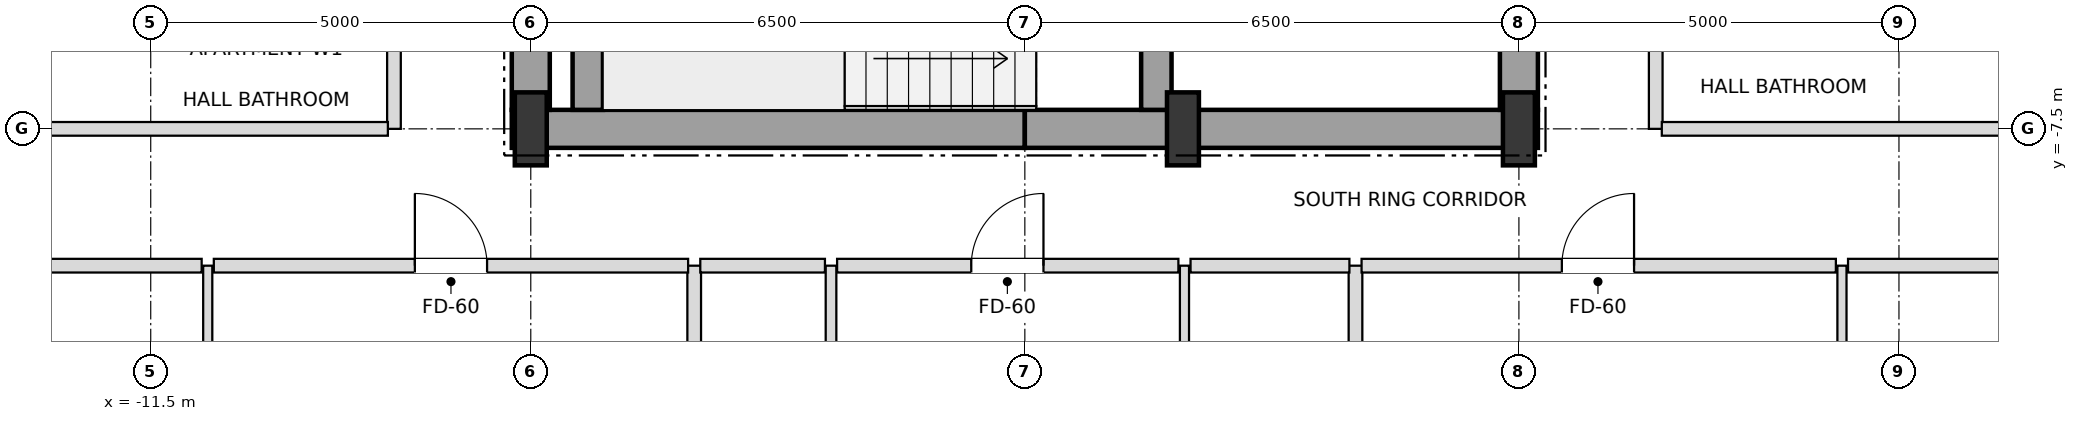
"""IFC4 building model, lengths in metres.
Left out: names, types, materials, properties, quantities, classifications, styles, units other than length and angle.
Written with IfcOpenShell. Run it as: python <this file> out.ifc"""

import sys

from ifc_helpers import new_model, si_unit, direction, frame, frame_2d, origin, origin_2d, place, context, subcontext, project, spatial, rectangle, i_section, extrude, element, fill, save


model = new_model("IFC4")
c1 = context("Model", 3, precision=1e-05, world=origin(), true_north=direction((0.0, 1.0)))
c2 = subcontext(c1, "Body", "Model", "MODEL_VIEW")
j1 = project(units=[si_unit("LENGTHUNIT", "METRE"), si_unit("PLANEANGLEUNIT", "RADIAN")], contexts=[c1])
p1 = place(None, origin())
s1 = spatial("IfcSite", under=j1, at=p1, CompositionType="ELEMENT")
p2 = place(p1, origin())
s2 = spatial("IfcBuilding", under=s1, at=p2, CompositionType="ELEMENT")
p3 = place(p2, frame((0.0, 0.0, 117.0)))
s3 = spatial("IfcBuildingStorey", under=s2, at=p3, CompositionType="ELEMENT", Elevation=117.0)
for number, where, z_axis, x_axis in (
    (1, (-6.5, -7.5, 0.0), (0.0, 0.0, 1.0), (1.0, 0.0, 0.0)),
    (2, (2.08, -7.5, 0.0), (0.0, 0.0, 1.0), (1.0, 0.0, 0.0)),
    (3, (6.5, -7.5, 0.0), (0.0, 0.0, 1.0), (1.0, 0.0, 0.0)),
):
    element("IfcColumn", number, at=place(p3, frame(where, z_axis=z_axis, x_axis=x_axis)), inside=s3, PredefinedType="COLUMN", context=c2, shape_type="SweptSolid", body=[
        extrude(i_section(OverallWidth=0.42, OverallDepth=0.96, WebThickness=0.022, FlangeThickness=0.034, at=origin_2d()), origin(), (0.0, 0.0, 1.0), 3.6),
    ])
for number, where, z_axis, x_axis in (
    (4, (-6.75, -7.5, 0.0), (0.0, 0.0, 1.0), (1.0, 0.0, 0.0)),
    (5, (0.0, -7.5, 0.0), (0.0, 0.0, 1.0), (1.0, 0.0, 0.0)),
):
    element("IfcWall", number, at=place(p3, frame(where, z_axis=z_axis, x_axis=x_axis)), inside=s3, PredefinedType="SHEAR", context=c2, shape_type="SweptSolid", body=[
        extrude(rectangle(XDim=6.75, YDim=0.5, at=frame_2d((3.375, 0.0))), origin(), (0.0, 0.0, 1.0), 3.3),
    ])
p4 = place(p3, frame((-6.5, -7.25, 0.0), z_axis=(0.0, 0.0, 1.0), x_axis=(0.0, 1.0, 0.0)))
e6 = element("IfcWall", 6, at=p4, inside=s3, PredefinedType="SHEAR", context=c2, shape_type="SweptSolid", body=[
    extrude(rectangle(XDim=3.55, YDim=0.5, at=frame_2d((1.775, 0.0))), origin(), (0.0, 0.0, 1.0), 3.3),
])
p5 = place(p3, frame((6.5, -7.25, 0.0), z_axis=(0.0, 0.0, 1.0), x_axis=(0.0, 1.0, 0.0)))
e7 = element("IfcWall", 7, at=p5, inside=s3, PredefinedType="SHEAR", context=c2, shape_type="SweptSolid", body=[
    extrude(rectangle(XDim=5.75, YDim=0.5, at=frame_2d((2.875, 0.0))), origin(), (0.0, 0.0, 1.0), 3.3),
])
p6 = place(p5, frame((0.85, 0.0, 0.0)))
e8 = element("IfcOpeningElement", 8, at=p6, cuts=e7, PredefinedType="OPENING", context=c2, shape_type="SweptSolid", body=[
    extrude(rectangle(XDim=1.05, YDim=2.15, at=frame_2d((0.525, 1.075))), frame((0.0, 0.26, 0.0), z_axis=(0.0, -1.0, 0.0), x_axis=(1.0, 0.0, 0.0)), (0.0, 0.0, 1.0), 0.52),
])
p7 = place(p3, frame((-5.75, -7.25, 0.0), z_axis=(0.0, 0.0, 1.0), x_axis=(0.0, 1.0, 0.0)))
e9 = element("IfcWall", 9, at=p7, inside=s3, PredefinedType="SHEAR", context=c2, shape_type="SweptSolid", body=[
    extrude(rectangle(XDim=2.9, YDim=0.4, at=frame_2d((1.45, 0.0))), origin(), (0.0, 0.0, 1.0), 3.3),
])
p8 = place(p3, frame((1.73, -7.25, 0.0), z_axis=(0.0, 0.0, 1.0), x_axis=(0.0, 1.0, 0.0)))
e10 = element("IfcWall", 10, at=p8, inside=s3, PredefinedType="SHEAR", context=c2, shape_type="SweptSolid", body=[
    extrude(rectangle(XDim=3.3, YDim=0.4, at=frame_2d((1.65, 0.0))), origin(), (0.0, 0.0, 1.0), 3.3),
])
p9 = place(p8, frame((0.9, 0.0, 0.0)))
e11 = element("IfcOpeningElement", 11, at=p9, cuts=e10, PredefinedType="OPENING", context=c2, shape_type="SweptSolid", body=[
    extrude(rectangle(XDim=1.05, YDim=2.15, at=frame_2d((0.525, 1.075))), frame((0.0, 0.21, 0.0), z_axis=(0.0, -1.0, 0.0), x_axis=(1.0, 0.0, 0.0)), (0.0, 0.0, 1.0), 0.42),
])
p10 = place(p3, frame((-10.75, -17.15, 0.0), z_axis=(0.0, 0.0, 1.0), x_axis=(0.0, 1.0, 0.0)))
e12 = element("IfcWall", 12, at=p10, inside=s3, PredefinedType="PARTITIONING", context=c2, shape_type="SweptSolid", body=[
    extrude(rectangle(XDim=7.85, YDim=0.12, at=frame_2d((3.925, 0.0))), origin(), (0.0, 0.0, 1.0), 2.736),
])
p11 = place(p10, frame((2.681, 0.0, 0.0)))
e13 = element("IfcOpeningElement", 13, at=p11, cuts=e12, PredefinedType="OPENING", context=c2, shape_type="SweptSolid", body=[
    extrude(rectangle(XDim=0.95, YDim=2.1, at=frame_2d((0.475, 1.05))), frame((0.0, 0.07, 0.0), z_axis=(0.0, -1.0, 0.0), x_axis=(1.0, 0.0, 0.0)), (0.0, 0.0, 1.0), 0.14),
])
p12 = place(p3, frame((-8.3, -7.5, 0.0), z_axis=(0.0, 0.0, 1.0), x_axis=(0.0, 1.0, 0.0)))
e14 = element("IfcWall", 14, at=p12, inside=s3, PredefinedType="PARTITIONING", context=c2, shape_type="SweptSolid", body=[
    extrude(rectangle(XDim=15.0, YDim=0.18, at=frame_2d((7.5, 0.0))), origin(), (0.0, 0.0, 1.0), 3.3),
])
p13 = place(p12, frame((3.145, 0.0, 0.0)))
e15 = element("IfcOpeningElement", 15, at=p13, cuts=e14, PredefinedType="OPENING", context=c2, shape_type="SweptSolid", body=[
    extrude(rectangle(XDim=0.95, YDim=2.15, at=frame_2d((0.475, 1.075))), frame((0.0, 0.1, 0.0), z_axis=(0.0, -1.0, 0.0), x_axis=(1.0, 0.0, 0.0)), (0.0, 0.0, 1.0), 0.2),
])
p14 = place(p12, frame((10.645, 0.0, 0.0)))
e16 = element("IfcOpeningElement", 16, at=p14, cuts=e14, PredefinedType="OPENING", context=c2, shape_type="SweptSolid", body=[
    extrude(rectangle(XDim=0.95, YDim=2.15, at=frame_2d((0.475, 1.075))), frame((0.0, 0.1, 0.0), z_axis=(0.0, -1.0, 0.0), x_axis=(1.0, 0.0, 0.0)), (0.0, 0.0, 1.0), 0.2),
])
p15 = place(p3, frame((-4.35, -23.15, 0.0), z_axis=(0.0, 0.0, 1.0), x_axis=(0.0, 1.0, 0.0)))
e17 = element("IfcWall", 17, at=p15, inside=s3, PredefinedType="PARTITIONING", context=c2, shape_type="SweptSolid", body=[
    extrude(rectangle(XDim=13.85, YDim=0.18, at=frame_2d((6.925, 0.0))), origin(), (0.0, 0.0, 1.0), 2.736),
])
p16 = place(p3, frame((-2.55, -17.15, 0.0), z_axis=(0.0, 0.0, 1.0), x_axis=(0.0, 1.0, 0.0)))
e18 = element("IfcWall", 18, at=p16, inside=s3, PredefinedType="PARTITIONING", context=c2, shape_type="SweptSolid", body=[
    extrude(rectangle(XDim=7.85, YDim=0.14, at=frame_2d((3.925, 0.0))), origin(), (0.0, 0.0, 1.0), 3.3),
])
p17 = place(p16, frame((3.48, 0.0, 0.0)))
e19 = element("IfcOpeningElement", 19, at=p17, cuts=e18, PredefinedType="OPENING", context=c2, shape_type="SweptSolid", body=[
    extrude(rectangle(XDim=0.9, YDim=2.1, at=frame_2d((0.45, 1.05))), frame((0.0, 0.08, 0.0), z_axis=(0.0, -1.0, 0.0), x_axis=(1.0, 0.0, 0.0)), (0.0, 0.0, 1.0), 0.16),
])
p18 = place(p3, frame((2.1, -17.15, 0.0), z_axis=(0.0, 0.0, 1.0), x_axis=(0.0, 1.0, 0.0)))
e20 = element("IfcWall", 20, at=p18, inside=s3, PredefinedType="PARTITIONING", context=c2, shape_type="SweptSolid", body=[
    extrude(rectangle(XDim=7.85, YDim=0.12, at=frame_2d((3.925, 0.0))), origin(), (0.0, 0.0, 1.0), 3.3),
])
p19 = place(p18, frame((3.455, 0.0, 0.0)))
e21 = element("IfcOpeningElement", 21, at=p19, cuts=e20, PredefinedType="OPENING", context=c2, shape_type="SweptSolid", body=[
    extrude(rectangle(XDim=0.95, YDim=2.1, at=frame_2d((0.475, 1.05))), frame((0.0, 0.07, 0.0), z_axis=(0.0, -1.0, 0.0), x_axis=(1.0, 0.0, 0.0)), (0.0, 0.0, 1.0), 0.14),
])
p20 = place(p3, frame((4.35, -23.15, 0.0), z_axis=(0.0, 0.0, 1.0), x_axis=(0.0, 1.0, 0.0)))
e22 = element("IfcWall", 22, at=p20, inside=s3, PredefinedType="PARTITIONING", context=c2, shape_type="SweptSolid", body=[
    extrude(rectangle(XDim=13.85, YDim=0.18, at=frame_2d((6.925, 0.0))), origin(), (0.0, 0.0, 1.0), 2.736),
])
p21 = place(p3, frame((8.3, -7.5, 0.0), z_axis=(0.0, 0.0, 1.0), x_axis=(0.0, 1.0, 0.0)))
e23 = element("IfcWall", 23, at=p21, inside=s3, PredefinedType="PARTITIONING", context=c2, shape_type="SweptSolid", body=[
    extrude(rectangle(XDim=15.0, YDim=0.18, at=frame_2d((7.5, 0.0))), origin(), (0.0, 0.0, 1.0), 3.3),
])
p22 = place(p21, frame((3.475, 0.0, 0.0)))
e24 = element("IfcOpeningElement", 24, at=p22, cuts=e23, PredefinedType="OPENING", context=c2, shape_type="SweptSolid", body=[
    extrude(rectangle(XDim=0.95, YDim=2.15, at=frame_2d((0.475, 1.075))), frame((0.0, 0.1, 0.0), z_axis=(0.0, -1.0, 0.0), x_axis=(1.0, 0.0, 0.0)), (0.0, 0.0, 1.0), 0.2),
])
p23 = place(p3, frame((10.75, -17.15, 0.0), z_axis=(0.0, 0.0, 1.0), x_axis=(0.0, 1.0, 0.0)))
e25 = element("IfcWall", 25, at=p23, inside=s3, PredefinedType="PARTITIONING", context=c2, shape_type="SweptSolid", body=[
    extrude(rectangle(XDim=7.85, YDim=0.12, at=frame_2d((3.925, 0.0))), origin(), (0.0, 0.0, 1.0), 2.736),
])
p24 = place(p23, frame((2.681, 0.0, 0.0)))
e26 = element("IfcOpeningElement", 26, at=p24, cuts=e25, PredefinedType="OPENING", context=c2, shape_type="SweptSolid", body=[
    extrude(rectangle(XDim=0.95, YDim=2.1, at=frame_2d((0.475, 1.05))), frame((0.0, 0.07, 0.0), z_axis=(0.0, -1.0, 0.0), x_axis=(1.0, 0.0, 0.0)), (0.0, 0.0, 1.0), 0.14),
])
p25 = place(p3, frame((-13.62, -9.3, 0.0), z_axis=(0.0, 0.0, 1.0), x_axis=(1.0, 0.0, 0.0)))
e27 = element("IfcWall", 27, at=p25, inside=s3, PredefinedType="PARTITIONING", context=c2, shape_type="SweptSolid", body=[
    extrude(rectangle(XDim=2.79, YDim=0.18, at=frame_2d((1.395, 0.0))), origin(), (0.0, 0.0, 1.0), 3.3),
])
p26 = place(p3, frame((-10.67, -9.3, 0.0), z_axis=(0.0, 0.0, 1.0), x_axis=(1.0, 0.0, 0.0)))
e28 = element("IfcWall", 28, at=p26, inside=s3, PredefinedType="PARTITIONING", context=c2, shape_type="SweptSolid", body=[
    extrude(rectangle(XDim=6.24, YDim=0.18, at=frame_2d((3.12, 0.0))), origin(), (0.0, 0.0, 1.0), 2.736),
])
p27 = place(p26, frame((2.645, 0.0, 0.0)))
e29 = element("IfcOpeningElement", 29, at=p27, cuts=e28, PredefinedType="OPENING", context=c2, shape_type="SweptSolid", body=[
    extrude(rectangle(XDim=0.95, YDim=2.15, at=frame_2d((0.475, 1.075))), frame((0.0, 0.1, 0.0), z_axis=(0.0, -1.0, 0.0), x_axis=(1.0, 0.0, 0.0)), (0.0, 0.0, 1.0), 0.2),
])
p28 = place(p3, frame((-4.27, -9.3, 0.0), z_axis=(0.0, 0.0, 1.0), x_axis=(1.0, 0.0, 0.0)))
e30 = element("IfcWall", 30, at=p28, inside=s3, PredefinedType="PARTITIONING", context=c2, shape_type="SweptSolid", body=[
    extrude(rectangle(XDim=1.64, YDim=0.18, at=frame_2d((0.82, 0.0))), origin(), (0.0, 0.0, 1.0), 3.3),
])
p29 = place(p3, frame((-2.47, -9.3, 0.0), z_axis=(0.0, 0.0, 1.0), x_axis=(1.0, 0.0, 0.0)))
e31 = element("IfcWall", 31, at=p29, inside=s3, PredefinedType="PARTITIONING", context=c2, shape_type="SweptSolid", body=[
    extrude(rectangle(XDim=4.49, YDim=0.18, at=frame_2d((2.245, 0.0))), origin(), (0.0, 0.0, 1.0), 3.3),
])
p30 = place(p29, frame((1.765, 0.0, 0.0)))
e32 = element("IfcOpeningElement", 32, at=p30, cuts=e31, PredefinedType="OPENING", context=c2, shape_type="SweptSolid", body=[
    extrude(rectangle(XDim=0.95, YDim=2.15, at=frame_2d((0.475, 1.075))), frame((0.0, 0.1, 0.0), z_axis=(0.0, -1.0, 0.0), x_axis=(1.0, 0.0, 0.0)), (0.0, 0.0, 1.0), 0.2),
])
p31 = place(p3, frame((2.18, -9.3, 0.0), z_axis=(0.0, 0.0, 1.0), x_axis=(1.0, 0.0, 0.0)))
e33 = element("IfcWall", 33, at=p31, inside=s3, PredefinedType="PARTITIONING", context=c2, shape_type="SweptSolid", body=[
    extrude(rectangle(XDim=2.09, YDim=0.18, at=frame_2d((1.045, 0.0))), origin(), (0.0, 0.0, 1.0), 3.3),
])
p32 = place(p3, frame((4.43, -9.3, 0.0), z_axis=(0.0, 0.0, 1.0), x_axis=(1.0, 0.0, 0.0)))
e34 = element("IfcWall", 34, at=p32, inside=s3, PredefinedType="PARTITIONING", context=c2, shape_type="SweptSolid", body=[
    extrude(rectangle(XDim=6.24, YDim=0.18, at=frame_2d((3.12, 0.0))), origin(), (0.0, 0.0, 1.0), 2.736),
])
p33 = place(p32, frame((2.635, 0.0, 0.0)))
e35 = element("IfcOpeningElement", 35, at=p33, cuts=e34, PredefinedType="OPENING", context=c2, shape_type="SweptSolid", body=[
    extrude(rectangle(XDim=0.95, YDim=2.15, at=frame_2d((0.475, 1.075))), frame((0.0, 0.1, 0.0), z_axis=(0.0, -1.0, 0.0), x_axis=(1.0, 0.0, 0.0)), (0.0, 0.0, 1.0), 0.2),
])
p34 = place(p3, frame((10.83, -9.3, 0.0), z_axis=(0.0, 0.0, 1.0), x_axis=(1.0, 0.0, 0.0)))
e36 = element("IfcWall", 36, at=p34, inside=s3, PredefinedType="PARTITIONING", context=c2, shape_type="SweptSolid", body=[
    extrude(rectangle(XDim=2.79, YDim=0.18, at=frame_2d((1.395, 0.0))), origin(), (0.0, 0.0, 1.0), 3.3),
])
for number, where, z_axis, x_axis in (
    (37, (-14.27, -7.5, 0.0), (0.0, 0.0, 1.0), (1.0, 0.0, 0.0)),
    (38, (8.38, -7.5, 0.0), (0.0, 0.0, 1.0), (1.0, 0.0, 0.0)),
):
    element("IfcWall", number, at=place(p3, frame(where, z_axis=z_axis, x_axis=x_axis)), inside=s3, PredefinedType="PARTITIONING", context=c2, shape_type="SweptSolid", body=[
        extrude(rectangle(XDim=5.89, YDim=0.18, at=frame_2d((2.945, 0.0))), origin(), (0.0, 0.0, 1.0), 2.736),
    ])
p35 = place(p27, origin())
e39 = element("IfcDoor", 39, at=p35, inside=s3, OperationType="SINGLE_SWING_LEFT", PredefinedType="DOOR", context=c2, shape_type="SweptSolid", body=[
    extrude(rectangle(XDim=0.95, YDim=2.15, at=frame_2d((0.475, 1.075))), frame((0.0, 0.025, 0.0), z_axis=(0.0, -1.0, 0.0), x_axis=(1.0, 0.0, 0.0)), (0.0, 0.0, 1.0), 0.05),
])
fill(e29, e39)
p36 = place(p30, origin())
e40 = element("IfcDoor", 40, at=p36, inside=s3, OperationType="SINGLE_SWING_RIGHT", PredefinedType="DOOR", context=c2, shape_type="SweptSolid", body=[
    extrude(rectangle(XDim=0.95, YDim=2.15, at=frame_2d((0.475, 1.075))), frame((0.0, 0.025, 0.0), z_axis=(0.0, -1.0, 0.0), x_axis=(1.0, 0.0, 0.0)), (0.0, 0.0, 1.0), 0.05),
])
fill(e32, e40)
p37 = place(p33, origin())
e41 = element("IfcDoor", 41, at=p37, inside=s3, OperationType="SINGLE_SWING_RIGHT", PredefinedType="DOOR", context=c2, shape_type="SweptSolid", body=[
    extrude(rectangle(XDim=0.95, YDim=2.15, at=frame_2d((0.475, 1.075))), frame((0.0, 0.025, 0.0), z_axis=(0.0, -1.0, 0.0), x_axis=(1.0, 0.0, 0.0)), (0.0, 0.0, 1.0), 0.05),
])
fill(e35, e41)
save(model, sys.argv[1])
